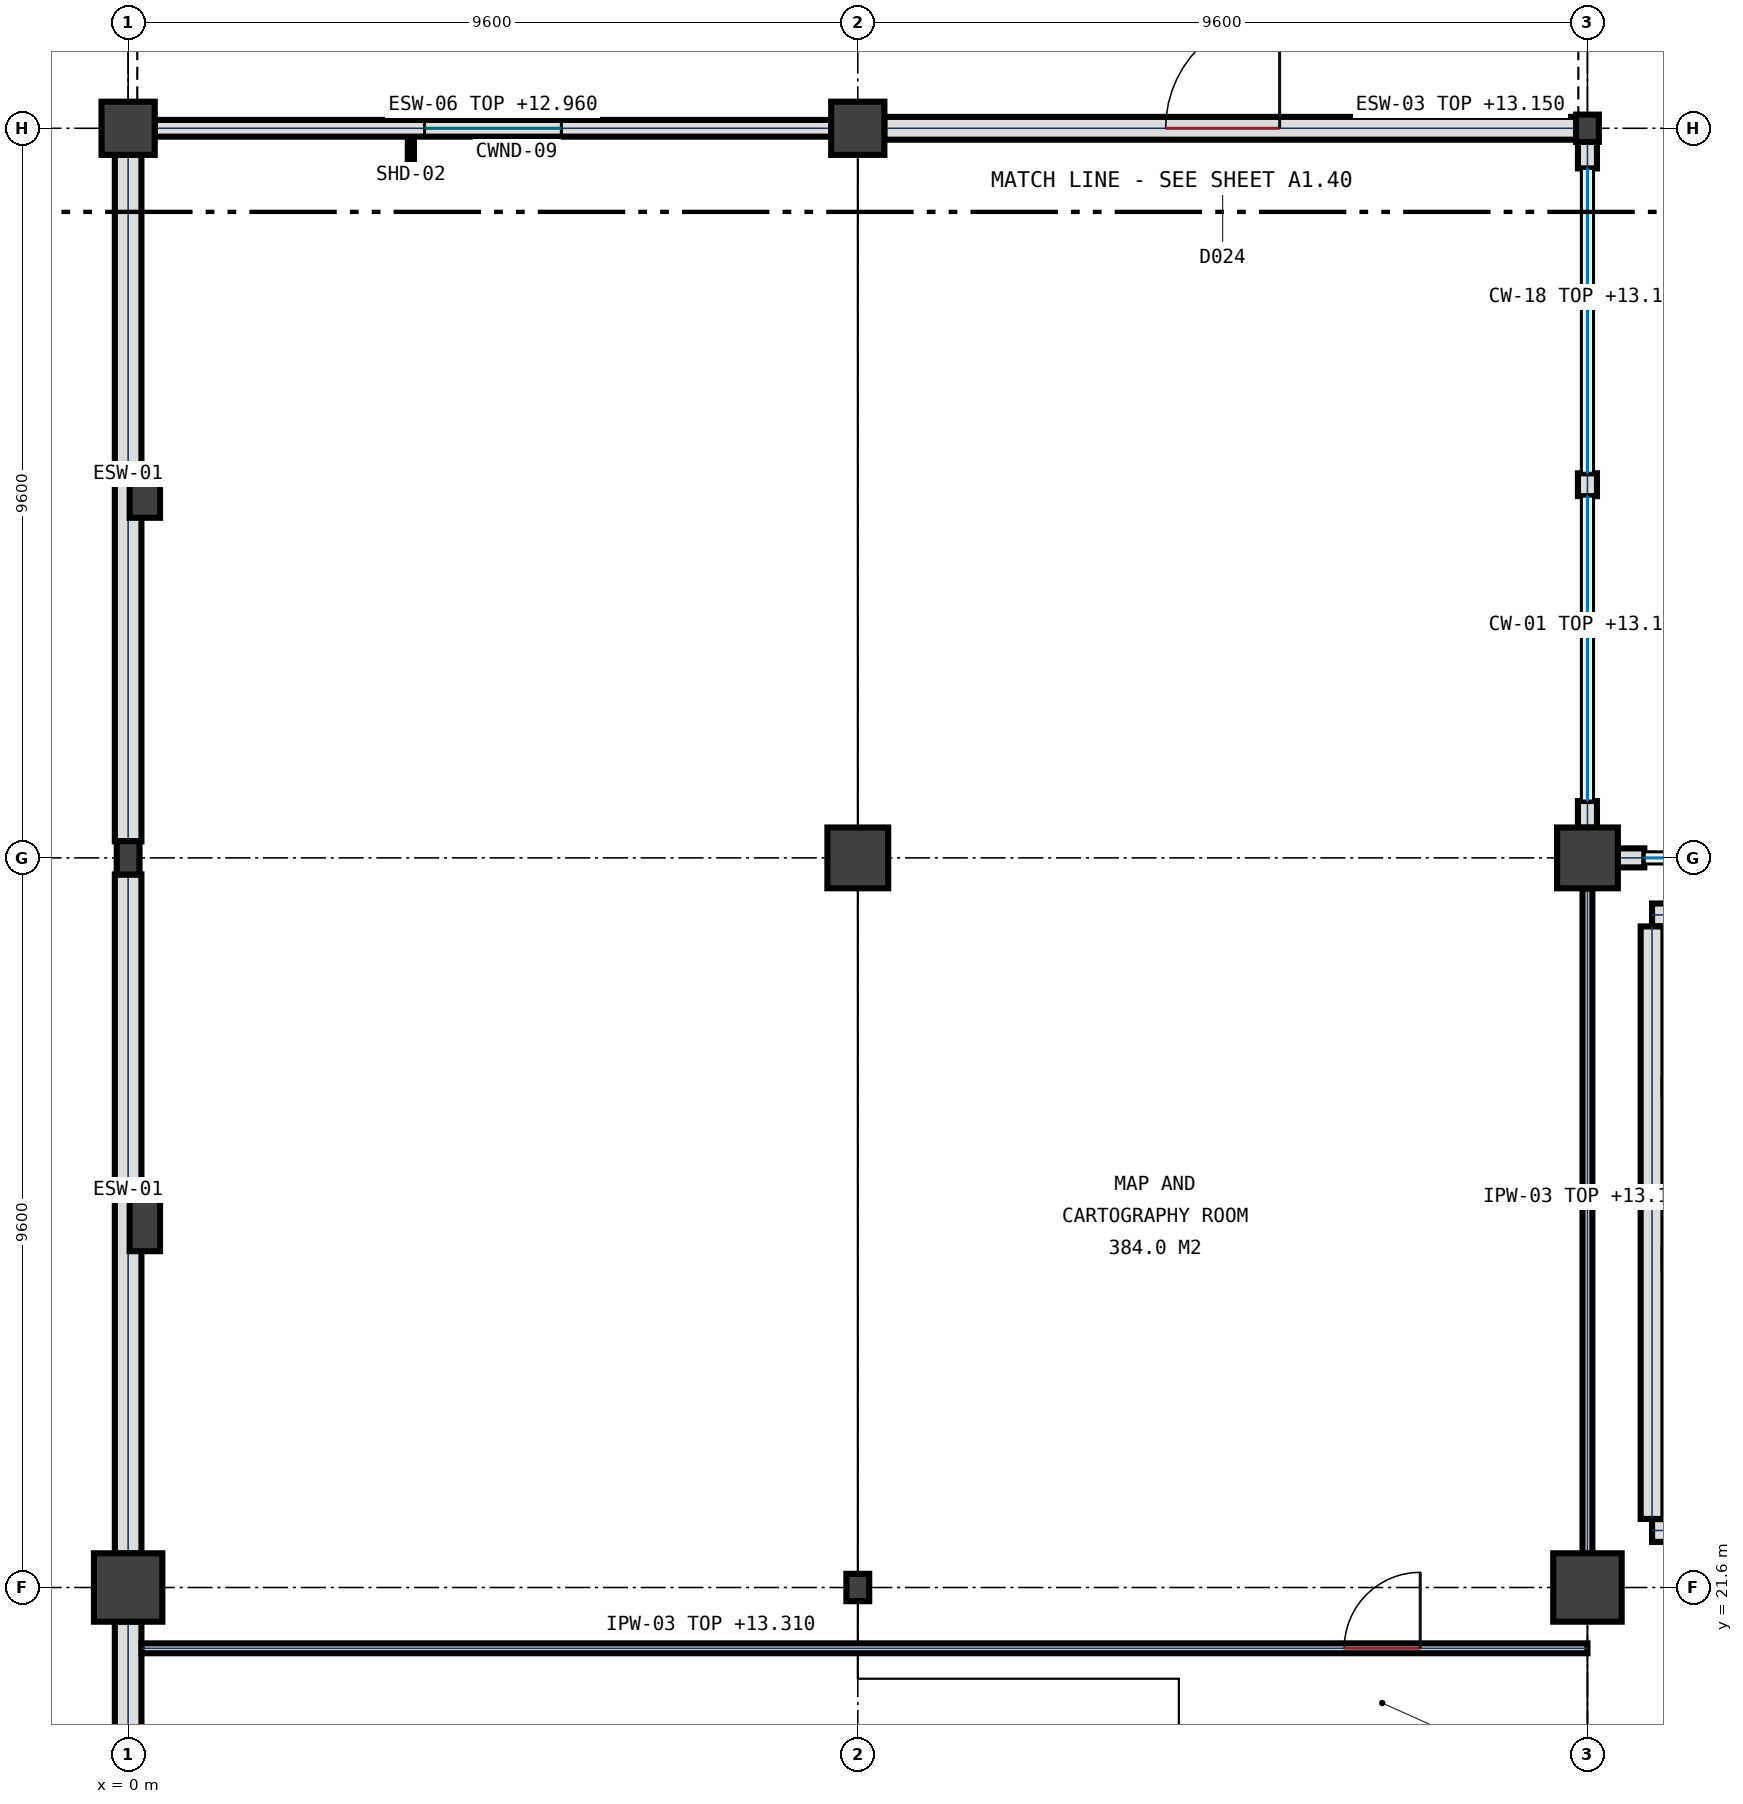
"""IFC4 building model, lengths in metres.
Left out: names, types, materials, properties, quantities, classifications, styles, units other than length and angle.
Written with IfcOpenShell. Run it as: python <this file> out.ifc"""

import sys

from ifc_helpers import new_model, si_unit, direction, frame, frame_2d, origin, origin_2d, place, context, subcontext, project, spatial, rectangle, circle, i_section, extrude, element, fill, save


model = new_model("IFC4")
c1 = context("Model", 3, precision=1e-05, world=origin(), true_north=direction((0.0, 1.0)))
c2 = subcontext(c1, "Body", "Model", "MODEL_VIEW")
j1 = project(units=[si_unit("LENGTHUNIT", "METRE"), si_unit("PLANEANGLEUNIT", "RADIAN")], contexts=[c1])
p1 = place(None, origin())
s1 = spatial("IfcSite", under=j1, at=p1, CompositionType="ELEMENT")
p2 = place(p1, origin())
s2 = spatial("IfcBuilding", under=s1, at=p2, CompositionType="ELEMENT")
p3 = place(p2, frame((0.0, 0.0, 9.9)))
s3 = spatial("IfcBuildingStorey", under=s2, at=p3, CompositionType="ELEMENT", Elevation=9.9)
p4 = place(p3, frame((0.0, 21.6, 0.0), z_axis=(0.0, 0.0, 1.0), x_axis=(1.0, 0.0, 0.0)))
e1 = element("IfcColumn", 1, at=p4, inside=s3, PredefinedType="COLUMN", context=c2, shape_type="SweptSolid", body=[
    extrude(circle(Radius=0.45, at=origin_2d()), origin(), (0.0, 0.0, 1.0), 4.5),
])
p5 = place(p3, frame((0.0, 31.2, 0.0), z_axis=(0.0, 0.0, 1.0), x_axis=(1.0, 0.0, 0.0)))
e2 = element("IfcColumn", 2, at=p5, inside=s3, PredefinedType="COLUMN", context=c2, shape_type="SweptSolid", body=[
    extrude(i_section(OverallWidth=0.3, OverallDepth=0.44, WebThickness=0.011, FlangeThickness=0.021, FilletRadius=0.027, at=origin_2d()), origin(), (0.0, 0.0, 1.0), 4.5),
])
p6 = place(p3, frame((0.0, 40.8, 0.0), z_axis=(0.0, 0.0, 1.0), x_axis=(1.0, 0.0, 0.0)))
e3 = element("IfcColumn", 3, at=p6, inside=s3, PredefinedType="COLUMN", context=c2, shape_type="SweptSolid", body=[
    extrude(circle(Radius=0.35, at=origin_2d()), origin(), (0.0, 0.0, 1.0), 4.5),
])
p7 = place(p3, frame((9.6, 21.6, 0.0), z_axis=(0.0, 0.0, 1.0), x_axis=(1.0, 0.0, 0.0)))
e4 = element("IfcColumn", 4, at=p7, inside=s3, PredefinedType="COLUMN", context=c2, shape_type="SweptSolid", body=[
    extrude(i_section(OverallWidth=0.3, OverallDepth=0.36, WebThickness=0.012, FlangeThickness=0.022, FilletRadius=0.027, at=origin_2d()), origin(), (0.0, 0.0, 1.0), 4.5),
])
p8 = place(p3, frame((9.6, 31.2, 0.0), z_axis=(0.0, 0.0, 1.0), x_axis=(1.0, 0.0, 0.0)))
e5 = element("IfcColumn", 5, at=p8, inside=s3, PredefinedType="COLUMN", context=c2, shape_type="SweptSolid", body=[
    extrude(circle(Radius=0.4, at=origin_2d()), origin(), (0.0, 0.0, 1.0), 4.5),
])
p9 = place(p3, frame((9.6, 40.8, 0.0), z_axis=(0.0, 0.0, 1.0), x_axis=(1.0, 0.0, 0.0)))
e6 = element("IfcColumn", 6, at=p9, inside=s3, PredefinedType="COLUMN", context=c2, shape_type="SweptSolid", body=[
    extrude(circle(Radius=0.35, at=origin_2d()), origin(), (0.0, 0.0, 1.0), 4.5),
])
p10 = place(p3, frame((19.2, 21.6, 0.0), z_axis=(0.0, 0.0, 1.0), x_axis=(1.0, 0.0, 0.0)))
e7 = element("IfcColumn", 7, at=p10, inside=s3, PredefinedType="COLUMN", context=c2, shape_type="SweptSolid", body=[
    extrude(circle(Radius=0.45, at=origin_2d()), origin(), (0.0, 0.0, 1.0), 4.5),
])
p11 = place(p3, frame((19.2, 31.2, 0.0), z_axis=(0.0, 0.0, 1.0), x_axis=(1.0, 0.0, 0.0)))
e8 = element("IfcColumn", 8, at=p11, inside=s3, PredefinedType="COLUMN", context=c2, shape_type="SweptSolid", body=[
    extrude(circle(Radius=0.4, at=origin_2d()), origin(), (0.0, 0.0, 1.0), 4.5),
])
p12 = place(p3, frame((19.2, 40.8, 0.0), z_axis=(0.0, 0.0, 1.0), x_axis=(1.0, 0.0, 0.0)))
e9 = element("IfcColumn", 9, at=p12, inside=s3, PredefinedType="COLUMN", context=c2, shape_type="SweptSolid", body=[
    extrude(i_section(OverallWidth=0.3, OverallDepth=0.36, WebThickness=0.012, FlangeThickness=0.022, FilletRadius=0.027, at=origin_2d()), origin(), (0.0, 0.0, 1.0), 4.5),
])
p13 = place(p3, frame((0.22, 26.4, 0.0), z_axis=(0.0, 0.0, 1.0), x_axis=(1.0, 0.0, 0.0)))
e10 = element("IfcColumn", 10, at=p13, inside=s3, PredefinedType="PILASTER", context=c2, shape_type="SweptSolid", body=[
    extrude(rectangle(XDim=0.4, YDim=0.75, at=origin_2d()), origin(), (0.0, 0.0, 1.0), 4.5),
])
p14 = place(p3, frame((0.22, 36.0, 0.0), z_axis=(0.0, 0.0, 1.0), x_axis=(1.0, 0.0, 0.0)))
e11 = element("IfcColumn", 11, at=p14, inside=s3, PredefinedType="PILASTER", context=c2, shape_type="SweptSolid", body=[
    extrude(rectangle(XDim=0.4, YDim=0.65, at=origin_2d()), origin(), (0.0, 0.0, 1.0), 4.5),
])
p15 = place(p3, frame((0.0, 12.248, 0.0), z_axis=(0.0, 0.0, 1.0), x_axis=(0.0, 1.0, 0.0)))
e12 = element("IfcWall", 12, at=p15, inside=s3, PredefinedType="SOLIDWALL", context=c2, shape_type="SweptSolid", body=[
    extrude(rectangle(XDim=8.904, YDim=0.35, at=frame_2d((4.452, 0.0))), origin(), (0.0, 0.0, 1.0), 4.22),
])
p16 = place(p3, frame((0.0, 22.048, 0.0), z_axis=(0.0, 0.0, 1.0), x_axis=(0.0, 1.0, 0.0)))
e13 = element("IfcWall", 13, at=p16, inside=s3, PredefinedType="SOLIDWALL", context=c2, shape_type="SweptSolid", body=[
    extrude(rectangle(XDim=8.934, YDim=0.35, at=frame_2d((4.467, 0.0))), origin(), (0.0, 0.0, 1.0), 4.22),
])
p17 = place(p3, frame((0.0, 31.418, 0.0), z_axis=(0.0, 0.0, 1.0), x_axis=(0.0, 1.0, 0.0)))
e14 = element("IfcWall", 14, at=p17, inside=s3, PredefinedType="SOLIDWALL", context=c2, shape_type="SweptSolid", body=[
    extrude(rectangle(XDim=9.034, YDim=0.35, at=frame_2d((4.517, 0.0))), origin(), (0.0, 0.0, 1.0), 4.26),
])
p18 = place(p3, frame((0.348, 40.8, 0.0), z_axis=(0.0, 0.0, 1.0), x_axis=(1.0, 0.0, 0.0)))
e15 = element("IfcWall", 15, at=p18, inside=s3, PredefinedType="SOLIDWALL", context=c2, shape_type="SweptSolid", body=[
    extrude(rectangle(XDim=8.904, YDim=0.22, at=frame_2d((4.452, 0.0))), origin(), (0.0, 0.0, 1.0), 3.06),
])
p19 = place(p18, frame((3.552, 0.0, 0.95)))
e16 = element("IfcOpeningElement", 16, at=p19, cuts=e15, PredefinedType="OPENING", context=c2, shape_type="SweptSolid", body=[
    extrude(rectangle(XDim=1.8, YDim=1.35, at=frame_2d((0.9, 0.675))), frame((0.0, 0.12, 0.0), z_axis=(0.0, -1.0, 0.0), x_axis=(1.0, 0.0, 0.0)), (0.0, 0.0, 1.0), 0.24),
])
p20 = place(p3, frame((9.948, 40.8, 0.0), z_axis=(0.0, 0.0, 1.0), x_axis=(1.0, 0.0, 0.0)))
e17 = element("IfcWall", 17, at=p20, inside=s3, PredefinedType="SOLIDWALL", context=c2, shape_type="SweptSolid", body=[
    extrude(rectangle(XDim=9.104, YDim=0.3, at=frame_2d((4.552, 0.0))), origin(), (0.0, 0.0, 1.0), 3.25),
])
p21 = place(p20, frame((3.702, 0.0, 0.0)))
e18 = element("IfcOpeningElement", 18, at=p21, cuts=e17, PredefinedType="OPENING", context=c2, shape_type="SweptSolid", body=[
    extrude(rectangle(XDim=1.5, YDim=2.2, at=frame_2d((0.75, 1.1))), frame((0.0, 0.16, 0.0), z_axis=(0.0, -1.0, 0.0), x_axis=(1.0, 0.0, 0.0)), (0.0, 0.0, 1.0), 0.32),
])
for number, where, z_axis, x_axis in (
    (19, (19.2, 40.622, 0.0), (0.0, 0.0, 1.0), (0.0, -1.0, 0.0)),
    (20, (19.2, 31.948, 0.0), (0.0, 0.0, 1.0), (0.0, -1.0, 0.0)),
):
    element("IfcWall", number, at=place(p3, frame(where, z_axis=z_axis, x_axis=x_axis)), inside=s3, PredefinedType="SOLIDWALL", context=c2, shape_type="SweptSolid", body=[
        extrude(rectangle(XDim=0.35, YDim=0.25, at=frame_2d((0.175, 0.0))), origin(), (0.0, 0.0, 1.0), 3.25),
    ])
p22 = place(p3, frame((19.2, 36.26, 0.0), z_axis=(0.0, 0.0, 1.0), x_axis=(0.0, -1.0, 0.0)))
e21 = element("IfcWall", 21, at=p22, inside=s3, PredefinedType="SOLIDWALL", context=c2, shape_type="SweptSolid", body=[
    extrude(rectangle(XDim=0.3, YDim=0.25, at=frame_2d((0.15, 0.0))), origin(), (0.0, 0.0, 1.0), 3.25),
])
p23 = place(p3, frame((19.598, 31.2, 0.0), z_axis=(0.0, 0.0, 1.0), x_axis=(1.0, 0.0, 0.0)))
e22 = element("IfcWall", 22, at=p23, inside=s3, PredefinedType="SOLIDWALL", context=c2, shape_type="SweptSolid", body=[
    extrude(rectangle(XDim=0.35, YDim=0.25, at=frame_2d((0.175, 0.0))), origin(), (0.0, 0.0, 1.0), 3.2),
])
for number, where, z_axis, x_axis in (
    (23, (29.55, 22.35, 0.0), (0.0, 0.0, 1.0), (-1.0, 0.0, 0.0)),
    (24, (20.05, 30.45, 0.0), (0.0, 0.0, 1.0), (1.0, 0.0, 0.0)),
):
    element("IfcWall", number, at=place(p3, frame(where, z_axis=z_axis, x_axis=x_axis)), inside=s3, PredefinedType="SHEAR", context=c2, shape_type="SweptSolid", body=[
        extrude(rectangle(XDim=9.5, YDim=0.3, at=frame_2d((4.75, 0.0))), origin(), (0.0, 0.0, 1.0), 4.5),
    ])
p24 = place(p3, frame((20.05, 22.502, 0.0), z_axis=(0.0, 0.0, 1.0), x_axis=(0.0, 1.0, 0.0)))
e25 = element("IfcWall", 25, at=p24, inside=s3, PredefinedType="SHEAR", context=c2, shape_type="SweptSolid", body=[
    extrude(rectangle(XDim=7.796, YDim=0.3, at=frame_2d((3.898, 0.0))), origin(), (0.0, 0.0, 1.0), 4.5),
])
p25 = place(p3, frame((0.178, 20.8, 0.0), z_axis=(0.0, 0.0, 1.0), x_axis=(1.0, 0.0, 0.0)))
e26 = element("IfcWall", 26, at=p25, inside=s3, PredefinedType="PARTITIONING", context=c2, shape_type="SweptSolid", body=[
    extrude(rectangle(XDim=19.022, YDim=0.13, at=frame_2d((9.511, 0.0))), origin(), (0.0, 0.0, 1.0), 3.41),
])
p26 = place(p25, frame((15.822, 0.0, 0.0)))
e27 = element("IfcOpeningElement", 27, at=p26, cuts=e26, PredefinedType="OPENING", context=c2, shape_type="SweptSolid", body=[
    extrude(rectangle(XDim=1.0, YDim=2.2, at=frame_2d((0.5, 1.1))), frame((0.0, 0.075, 0.0), z_axis=(0.0, -1.0, 0.0), x_axis=(1.0, 0.0, 0.0)), (0.0, 0.0, 1.0), 0.15),
])
p27 = place(p3, frame((19.2, 22.053, 0.0), z_axis=(0.0, 0.0, 1.0), x_axis=(0.0, 1.0, 0.0)))
e28 = element("IfcWall", 28, at=p27, inside=s3, PredefinedType="PARTITIONING", context=c2, shape_type="SweptSolid", body=[
    extrude(rectangle(XDim=8.744, YDim=0.13, at=frame_2d((4.372, 0.0))), origin(), (0.0, 0.0, 1.0), 3.25),
])
p28 = place(p19, origin())
e29 = element("IfcWindow", 29, at=p28, inside=s3, PartitioningType="SINGLE_PANEL", PredefinedType="WINDOW", context=c2, shape_type="SweptSolid", body=[
    extrude(rectangle(XDim=1.8, YDim=1.35, at=frame_2d((0.9, 0.675))), frame((0.0, 0.032, 0.0), z_axis=(0.0, -1.0, 0.0), x_axis=(1.0, 0.0, 0.0)), (0.0, 0.0, 1.0), 0.065),
])
fill(e16, e29)
p29 = place(p21, origin())
e30 = element("IfcDoor", 30, at=p29, inside=s3, OperationType="SINGLE_SWING_RIGHT", PredefinedType="DOOR", context=c2, shape_type="SweptSolid", body=[
    extrude(rectangle(XDim=1.5, YDim=2.2, at=frame_2d((0.75, 1.1))), frame((0.0, 0.032, 0.0), z_axis=(0.0, -1.0, 0.0), x_axis=(1.0, 0.0, 0.0)), (0.0, 0.0, 1.0), 0.065),
])
fill(e18, e30)
p30 = place(p26, origin())
e31 = element("IfcDoor", 31, at=p30, inside=s3, OperationType="SINGLE_SWING_RIGHT", PredefinedType="DOOR", context=c2, shape_type="SweptSolid", body=[
    extrude(rectangle(XDim=1.0, YDim=2.2, at=frame_2d((0.5, 1.1))), frame((0.0, 0.032, 0.0), z_axis=(0.0, -1.0, 0.0), x_axis=(1.0, 0.0, 0.0)), (0.0, 0.0, 1.0), 0.065),
])
fill(e27, e31)
save(model, sys.argv[1])
